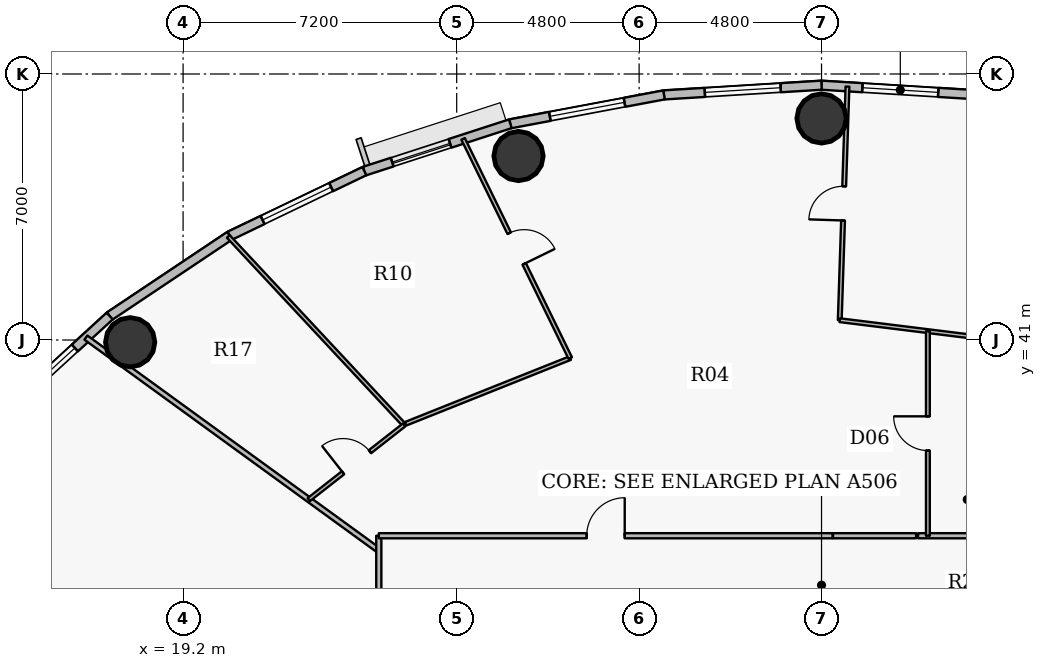
"""IFC4 building model, lengths in metres.
Left out: names, types, materials, properties, quantities, classifications, styles, units other than length and angle.
Written with IfcOpenShell. Run it as: python <this file> out.ifc"""

import sys

from ifc_helpers import new_model, si_unit, direction, frame, frame_2d, origin, origin_2d, place, context, subcontext, project, spatial, rectangle, hollow_circle, extrude, source, transform, mapped, element, fill, save


model = new_model("IFC4")
c1 = context("Model", 3, precision=1e-05, world=origin(), true_north=direction((0.0, 1.0)))
c2 = subcontext(c1, "Body", "Model", "MODEL_VIEW")
j1 = project(units=[si_unit("LENGTHUNIT", "METRE"), si_unit("PLANEANGLEUNIT", "RADIAN")], contexts=[c1])
p1 = place(None, origin())
s1 = spatial("IfcSite", under=j1, at=p1, CompositionType="ELEMENT")
p2 = place(p1, origin())
s2 = spatial("IfcBuilding", under=s1, at=p2, CompositionType="ELEMENT")
p3 = place(p2, frame((0.0, 0.0, 197.4)))
s3 = spatial("IfcBuildingStorey", under=s2, at=p3, CompositionType="ELEMENT", Elevation=197.4)
for number, where, z_axis, x_axis in (
    (1, (36.0, 46.83, 0.0), (0.0, 0.0, 1.0), (1.0, 0.0, 0.0)),
    (2, (28.027, 45.841, 0.0), (0.0, 0.0, 1.0), (1.0, 0.0, 0.0)),
    (3, (17.808, 40.942, 0.0), (0.0, 0.0, 1.0), (1.0, 0.0, 0.0)),
):
    element("IfcColumn", number, at=place(p3, frame(where, z_axis=z_axis, x_axis=x_axis)), inside=s3, PredefinedType="COLUMN", context=c2, shape_type="SweptSolid", body=[
        extrude(hollow_circle(Radius=0.65, WallThickness=0.04, at=origin_2d()), origin(), (0.0, 0.0, 1.0), 3.75),
    ])
p4 = place(p3, frame((36.0, 47.705, 0.0), z_axis=(0.0, 0.0, 1.0), x_axis=(0.998104600619, -0.061540281305, 0.0)))
e4 = element("IfcWall", 4, at=p4, inside=s3, PredefinedType="SOLIDWALL", context=c2, shape_type="SweptSolid", body=[
    extrude(rectangle(XDim=4.154, YDim=0.24, at=frame_2d((2.077, 0.0))), origin(), (0.0, 0.0, 1.0), 3.5),
])
p5 = place(p4, frame((1.077, 0.0, 0.9)))
e5 = element("IfcOpeningElement", 5, at=p5, cuts=e4, PredefinedType="OPENING", context=c2, shape_type="SweptSolid", body=[
    extrude(rectangle(XDim=2.0, YDim=1.75, at=origin_2d()), frame((1.0, 0.13, 0.875), z_axis=(0.0, -1.0, 0.0), x_axis=(1.0, 0.0, 0.0)), (0.0, 0.0, 1.0), 0.26),
])
p6 = place(p3, frame((31.854, 47.449, 0.0), z_axis=(0.0, 0.0, 1.0), x_axis=(0.998104600619, 0.061540281305, 0.0)))
e6 = element("IfcWall", 6, at=p6, inside=s3, PredefinedType="SOLIDWALL", context=c2, shape_type="SweptSolid", body=[
    extrude(rectangle(XDim=4.154, YDim=0.24, at=frame_2d((2.077, 0.0))), origin(), (0.0, 0.0, 1.0), 3.5),
])
p7 = place(p6, frame((1.077, 0.0, 0.9)))
e7 = element("IfcOpeningElement", 7, at=p7, cuts=e6, PredefinedType="OPENING", context=c2, shape_type="SweptSolid", body=[
    extrude(rectangle(XDim=2.0, YDim=1.75, at=origin_2d()), frame((1.0, 0.13, 0.875), z_axis=(0.0, -1.0, 0.0), x_axis=(1.0, 0.0, 0.0)), (0.0, 0.0, 1.0), 0.26),
])
p8 = place(p3, frame((27.811, 46.689, 0.0), z_axis=(0.0, 0.0, 1.0), x_axis=(0.982788108205, 0.184736391573, 0.0)))
e8 = element("IfcWall", 8, at=p8, inside=s3, PredefinedType="SOLIDWALL", context=c2, shape_type="SweptSolid", body=[
    extrude(rectangle(XDim=4.114, YDim=0.24, at=frame_2d((2.057, 0.0))), origin(), (0.0, 0.0, 1.0), 3.5),
])
p9 = place(p8, frame((1.057, 0.0, 0.9)))
e9 = element("IfcOpeningElement", 9, at=p9, cuts=e8, PredefinedType="OPENING", context=c2, shape_type="SweptSolid", body=[
    extrude(rectangle(XDim=2.0, YDim=1.75, at=origin_2d()), frame((1.0, 0.13, 0.875), z_axis=(0.0, -1.0, 0.0), x_axis=(1.0, 0.0, 0.0)), (0.0, 0.0, 1.0), 0.26),
])
p10 = place(p3, frame((23.97, 45.444, 0.0), z_axis=(0.0, 0.0, 1.0), x_axis=(0.951209870236, 0.30854462038, 0.0)))
e10 = element("IfcWall", 10, at=p10, inside=s3, PredefinedType="SOLIDWALL", context=c2, shape_type="SweptSolid", body=[
    extrude(rectangle(XDim=4.038, YDim=0.24, at=frame_2d((2.019, 0.0))), origin(), (0.0, 0.0, 1.0), 3.5),
])
p11 = place(p10, frame((0.77, 0.0, 0.9)))
e11 = element("IfcOpeningElement", 11, at=p11, cuts=e10, PredefinedType="OPENING", context=c2, shape_type="SweptSolid", body=[
    extrude(rectangle(XDim=1.6, YDim=1.75, at=origin_2d()), frame((0.8, 0.13, 0.875), z_axis=(0.0, -1.0, 0.0), x_axis=(1.0, 0.0, 0.0)), (0.0, 0.0, 1.0), 0.26),
])
p12 = place(p3, frame((20.427, 43.743, 0.0), z_axis=(0.0, 0.0, 1.0), x_axis=(0.901564733809, 0.432644231155, 0.0)))
e12 = element("IfcWall", 12, at=p12, inside=s3, PredefinedType="SOLIDWALL", context=c2, shape_type="SweptSolid", body=[
    extrude(rectangle(XDim=3.93, YDim=0.24, at=frame_2d((1.965, 0.0))), origin(), (0.0, 0.0, 1.0), 3.5),
])
p13 = place(p12, frame((0.96, 0.0, 0.9)))
e13 = element("IfcOpeningElement", 13, at=p13, cuts=e12, PredefinedType="OPENING", context=c2, shape_type="SweptSolid", body=[
    extrude(rectangle(XDim=2.0, YDim=1.75, at=origin_2d()), frame((1.0, 0.13, 0.875), z_axis=(0.0, -1.0, 0.0), x_axis=(1.0, 0.0, 0.0)), (0.0, 0.0, 1.0), 0.26),
])
p14 = place(p3, frame((17.268, 41.631, 0.0), z_axis=(0.0, 0.0, 1.0), x_axis=(0.831228998277, 0.555930168657, 0.0)))
e14 = element("IfcWall", 14, at=p14, inside=s3, PredefinedType="SOLIDWALL", context=c2, shape_type="SweptSolid", body=[
    extrude(rectangle(XDim=3.8, YDim=0.24, at=frame_2d((1.9, 0.0))), origin(), (0.0, 0.0, 1.0), 3.5),
])
p15 = place(p3, frame((14.572, 39.158, 0.0), z_axis=(0.0, 0.0, 1.0), x_axis=(0.737076565834, 0.675809245349, 0.0)))
e15 = element("IfcWall", 15, at=p15, inside=s3, PredefinedType="SOLIDWALL", context=c2, shape_type="SweptSolid", body=[
    extrude(rectangle(XDim=3.658, YDim=0.24, at=frame_2d((1.829, 0.0))), origin(), (0.0, 0.0, 1.0), 3.5),
])
p16 = place(p15, frame((0.815, 0.0, 0.9)))
e16 = element("IfcOpeningElement", 16, at=p16, cuts=e15, PredefinedType="OPENING", context=c2, shape_type="SweptSolid", body=[
    extrude(rectangle(XDim=1.6, YDim=1.75, at=origin_2d()), frame((0.8, 0.13, 0.875), z_axis=(0.0, -1.0, 0.0), x_axis=(1.0, 0.0, 0.0)), (0.0, 0.0, 1.0), 0.26),
])
p17 = place(p3, frame((16.643, 41.064, 0.0), z_axis=(0.0, 0.0, 1.0), x_axis=(0.809016355942, -0.587786131018, 0.0)))
e17 = element("IfcWall", 17, at=p17, inside=s3, PredefinedType="PARTITIONING", context=c2, shape_type="SweptSolid", body=[
    extrude(rectangle(XDim=9.527, YDim=0.135, at=frame_2d((4.764, 0.0))), origin(), (0.0, 0.0, 1.0), 2.935),
])
p18 = place(p3, frame((20.39, 43.725, 0.0), z_axis=(0.0, 0.0, 1.0), x_axis=(0.682297728918, -0.73107442105, 0.0)))
e18 = element("IfcWall", 18, at=p18, inside=s3, PredefinedType="PARTITIONING", context=c2, shape_type="SweptSolid", body=[
    extrude(rectangle(XDim=6.782, YDim=0.1, at=frame_2d((3.391, 0.0))), origin(), (0.0, 0.0, 1.0), 2.935),
])
p19 = place(p3, frame((22.509, 36.802, 0.0), z_axis=(0.0, 0.0, 1.0), x_axis=(0.787322269852, 0.616541680177, 0.0)))
e19 = element("IfcWall", 19, at=p19, inside=s3, PredefinedType="PARTITIONING", context=c2, shape_type="SweptSolid", body=[
    extrude(rectangle(XDim=3.187, YDim=0.1, at=frame_2d((1.593, 0.0))), origin(), (0.0, 0.0, 1.0), 2.935),
])
p20 = place(p19, frame((1.143, 0.0, 0.0)))
e20 = element("IfcOpeningElement", 20, at=p20, cuts=e19, PredefinedType="OPENING", context=c2, shape_type="SweptSolid", body=[
    extrude(rectangle(XDim=0.9, YDim=2.1, at=origin_2d()), frame((0.45, 0.06, 1.05), z_axis=(0.0, -1.0, 0.0), x_axis=(1.0, 0.0, 0.0)), (0.0, 0.0, 1.0), 0.12),
])
p21 = place(p3, frame((24.35, 27.95, 0.0), z_axis=(0.0, 0.0, 1.0), x_axis=(0.0, 1.0, 0.0)))
e21 = element("IfcWall", 21, at=p21, inside=s3, PredefinedType="PARTITIONING", context=c2, shape_type="SweptSolid", body=[
    extrude(rectangle(XDim=7.9, YDim=0.135, at=frame_2d((3.95, 0.0))), origin(), (0.0, 0.0, 1.0), 2.935),
])
p22 = place(p3, frame((24.35, 35.85, 0.0), z_axis=(0.0, 0.0, 1.0), x_axis=(1.0, 0.0, 0.0)))
e22 = element("IfcWall", 22, at=p22, inside=s3, PredefinedType="PARTITIONING", context=c2, shape_type="SweptSolid", body=[
    extrude(rectangle(XDim=11.942, YDim=0.135, at=frame_2d((5.971, 0.0))), origin(), (0.0, 0.0, 1.0), 2.935),
])
p23 = place(p22, frame((5.471, 0.0, 0.0)))
e23 = element("IfcOpeningElement", 23, at=p23, cuts=e22, PredefinedType="OPENING", context=c2, shape_type="SweptSolid", body=[
    extrude(rectangle(XDim=1.0, YDim=2.15, at=origin_2d()), frame((0.5, 0.078, 1.075), z_axis=(0.0, -1.0, 0.0), x_axis=(1.0, 0.0, 0.0)), (0.0, 0.0, 1.0), 0.155),
])
p24 = place(p3, frame((25.055, 38.796, 0.0), z_axis=(0.0, 0.0, 1.0), x_axis=(0.928801214375, 0.370578337434, 0.0)))
e24 = element("IfcWall", 24, at=p24, inside=s3, PredefinedType="PARTITIONING", context=c2, shape_type="SweptSolid", body=[
    extrude(rectangle(XDim=4.664, YDim=0.1, at=frame_2d((2.332, 0.0))), origin(), (0.0, 0.0, 1.0), 3.5),
])
p25 = place(p3, frame((26.568, 46.292, 0.0), z_axis=(0.0, 0.0, 1.0), x_axis=(0.439223775301, -0.898377690735, 0.0)))
e25 = element("IfcWall", 25, at=p25, inside=s3, PredefinedType="PARTITIONING", context=c2, shape_type="SweptSolid", body=[
    extrude(rectangle(XDim=6.419, YDim=0.1, at=frame_2d((3.209, 0.0))), origin(), (0.0, 0.0, 1.0), 2.935),
])
p26 = place(p25, frame((2.76, 0.0, 0.0)))
e26 = element("IfcOpeningElement", 26, at=p26, cuts=e25, PredefinedType="OPENING", context=c2, shape_type="SweptSolid", body=[
    extrude(rectangle(XDim=0.9, YDim=2.1, at=origin_2d()), frame((0.45, 0.06, 1.05), z_axis=(0.0, -1.0, 0.0), x_axis=(1.0, 0.0, 0.0)), (0.0, 0.0, 1.0), 0.12),
])
p27 = place(p3, frame((36.48, 41.521, 0.0), z_axis=(0.0, 0.0, 1.0), x_axis=(0.033029315495, 0.99945438331, 0.0)))
e27 = element("IfcWall", 27, at=p27, inside=s3, PredefinedType="PARTITIONING", context=c2, shape_type="SweptSolid", body=[
    extrude(rectangle(XDim=6.15, YDim=0.1, at=frame_2d((3.075, 0.0))), origin(), (0.0, 0.0, 1.0), 2.935),
])
p28 = place(p27, frame((2.625, 0.0, 0.0)))
e28 = element("IfcOpeningElement", 28, at=p28, cuts=e27, PredefinedType="OPENING", context=c2, shape_type="SweptSolid", body=[
    extrude(rectangle(XDim=0.9, YDim=2.1, at=origin_2d()), frame((0.45, 0.06, 1.05), z_axis=(0.0, -1.0, 0.0), x_axis=(1.0, 0.0, 0.0)), (0.0, 0.0, 1.0), 0.12),
])
p29 = place(p3, frame((36.48, 41.521, 0.0), z_axis=(0.0, 0.0, 1.0), x_axis=(0.992397562131, -0.123073468612, 0.0)))
e29 = element("IfcWall", 29, at=p29, inside=s3, PredefinedType="PARTITIONING", context=c2, shape_type="SweptSolid", body=[
    extrude(rectangle(XDim=5.314, YDim=0.1, at=frame_2d((2.657, 0.0))), origin(), (0.0, 0.0, 1.0), 3.5),
])
p30 = place(p3, frame((38.541, 35.85, 0.0), z_axis=(0.0, 0.0, 1.0), x_axis=(1.0, 0.0, 0.0)))
e30 = element("IfcWall", 30, at=p30, inside=s3, PredefinedType="PARTITIONING", context=c2, shape_type="SweptSolid", body=[
    extrude(rectangle(XDim=14.913, YDim=0.135, at=frame_2d((7.456, 0.0))), origin(), (0.0, 0.0, 1.0), 2.935),
])
p31 = place(p30, frame((9.46, 0.0, 0.0)))
e31 = element("IfcOpeningElement", 31, at=p31, cuts=e30, PredefinedType="OPENING", context=c2, shape_type="SweptSolid", body=[
    extrude(rectangle(XDim=1.0, YDim=2.15, at=origin_2d()), frame((0.5, 0.078, 1.075), z_axis=(0.0, -1.0, 0.0), x_axis=(1.0, 0.0, 0.0)), (0.0, 0.0, 1.0), 0.155),
])
p32 = place(p3, frame((38.799, 35.85, 0.0), z_axis=(0.0, 0.0, 1.0), x_axis=(0.0, 1.0, 0.0)))
e32 = element("IfcWall", 32, at=p32, inside=s3, PredefinedType="PARTITIONING", context=c2, shape_type="SweptSolid", body=[
    extrude(rectangle(XDim=5.384, YDim=0.1, at=frame_2d((2.692, 0.0))), origin(), (0.0, 0.0, 1.0), 3.5),
])
p33 = place(p32, frame((2.242, 0.0, 0.0)))
e33 = element("IfcOpeningElement", 33, at=p33, cuts=e32, PredefinedType="OPENING", context=c2, shape_type="SweptSolid", body=[
    extrude(rectangle(XDim=0.9, YDim=2.1, at=origin_2d()), frame((0.45, 0.06, 1.05), z_axis=(0.0, -1.0, 0.0), x_axis=(1.0, 0.0, 0.0)), (0.0, 0.0, 1.0), 0.12),
])
p34 = place(p3, frame((36.302, 35.85, 0.0), z_axis=(0.0, 0.0, 1.0), x_axis=(1.0, 0.0, 0.0)))
e34 = element("IfcWall", 34, at=p34, inside=s3, PredefinedType="PARTITIONING", context=c2, shape_type="SweptSolid", body=[
    extrude(rectangle(XDim=2.187, YDim=0.135, at=frame_2d((1.093, 0.0))), origin(), (0.0, 0.0, 1.0), 3.5),
])
m1 = source(origin(), c2, "Body", "SweptSolid", [
    extrude(rectangle(XDim=2.0, YDim=1.75, at=origin_2d()), frame((1.0, 0.03, 0.875), z_axis=(0.0, -1.0, 0.0), x_axis=(1.0, 0.0, 0.0)), (0.0, 0.0, 1.0), 0.06),
])
p35 = place(p5, origin())
e35 = element("IfcWindow", 35, at=p35, inside=s3, PartitioningType="DOUBLE_PANEL_VERTICAL", PredefinedType="WINDOW", context=c2, shape_type="MappedRepresentation", body=[
    mapped(m1, transform((0.0, 0.0, 0.0), x_axis=(1.0, 0.0, 0.0), y_axis=(0.0, 1.0, 0.0), z_axis=(0.0, 0.0, 1.0), scale=1.0)),
])
fill(e5, e35)
p36 = place(p7, origin())
e36 = element("IfcWindow", 36, at=p36, inside=s3, PartitioningType="DOUBLE_PANEL_VERTICAL", PredefinedType="WINDOW", context=c2, shape_type="MappedRepresentation", body=[
    mapped(m1, transform((0.0, 0.0, 0.0), x_axis=(1.0, 0.0, 0.0), y_axis=(0.0, 1.0, 0.0), z_axis=(0.0, 0.0, 1.0), scale=1.0)),
])
fill(e7, e36)
p37 = place(p9, origin())
e37 = element("IfcWindow", 37, at=p37, inside=s3, PartitioningType="DOUBLE_PANEL_VERTICAL", PredefinedType="WINDOW", context=c2, shape_type="MappedRepresentation", body=[
    mapped(m1, transform((0.0, 0.0, 0.0), x_axis=(1.0, 0.0, 0.0), y_axis=(0.0, 1.0, 0.0), z_axis=(0.0, 0.0, 1.0), scale=1.0)),
])
fill(e9, e37)
m2 = source(origin(), c2, "Body", "SweptSolid", [
    extrude(rectangle(XDim=1.6, YDim=1.75, at=origin_2d()), frame((0.8, 0.03, 0.875), z_axis=(0.0, -1.0, 0.0), x_axis=(1.0, 0.0, 0.0)), (0.0, 0.0, 1.0), 0.06),
])
p38 = place(p11, origin())
e38 = element("IfcWindow", 38, at=p38, inside=s3, PartitioningType="DOUBLE_PANEL_VERTICAL", PredefinedType="WINDOW", context=c2, shape_type="MappedRepresentation", body=[
    mapped(m2, transform((0.0, 0.0, 0.0), x_axis=(1.0, 0.0, 0.0), y_axis=(0.0, 1.0, 0.0), z_axis=(0.0, 0.0, 1.0), scale=1.0)),
])
fill(e11, e38)
p39 = place(p13, origin())
e39 = element("IfcWindow", 39, at=p39, inside=s3, PartitioningType="DOUBLE_PANEL_VERTICAL", PredefinedType="WINDOW", context=c2, shape_type="MappedRepresentation", body=[
    mapped(m1, transform((0.0, 0.0, 0.0), x_axis=(1.0, 0.0, 0.0), y_axis=(0.0, 1.0, 0.0), z_axis=(0.0, 0.0, 1.0), scale=1.0)),
])
fill(e13, e39)
p40 = place(p16, origin())
e40 = element("IfcWindow", 40, at=p40, inside=s3, PartitioningType="DOUBLE_PANEL_VERTICAL", PredefinedType="WINDOW", context=c2, shape_type="MappedRepresentation", body=[
    mapped(m2, transform((0.0, 0.0, 0.0), x_axis=(1.0, 0.0, 0.0), y_axis=(0.0, 1.0, 0.0), z_axis=(0.0, 0.0, 1.0), scale=1.0)),
])
fill(e16, e40)
m3 = source(origin(), c2, "Body", "SweptSolid", [
    extrude(rectangle(XDim=1.0, YDim=2.15, at=origin_2d()), frame((0.5, 0.025, 1.075), z_axis=(0.0, -1.0, 0.0), x_axis=(1.0, 0.0, 0.0)), (0.0, 0.0, 1.0), 0.05),
])
p41 = place(p23, origin())
e41 = element("IfcDoor", 41, at=p41, inside=s3, OperationType="SINGLE_SWING_RIGHT", PredefinedType="DOOR", context=c2, shape_type="MappedRepresentation", body=[
    mapped(m3, transform((0.0, 0.0, 0.0), x_axis=(1.0, 0.0, 0.0), y_axis=(0.0, 1.0, 0.0), z_axis=(0.0, 0.0, 1.0), scale=1.0)),
])
fill(e23, e41)
m4 = source(origin(), c2, "Body", "SweptSolid", [
    extrude(rectangle(XDim=0.9, YDim=2.1, at=origin_2d()), frame((0.45, 0.025, 1.05), z_axis=(0.0, -1.0, 0.0), x_axis=(1.0, 0.0, 0.0)), (0.0, 0.0, 1.0), 0.05),
])
p42 = place(p28, origin())
e42 = element("IfcDoor", 42, at=p42, inside=s3, OperationType="SINGLE_SWING_LEFT", PredefinedType="DOOR", context=c2, shape_type="MappedRepresentation", body=[
    mapped(m4, transform((0.0, 0.0, 0.0), x_axis=(1.0, 0.0, 0.0), y_axis=(0.0, 1.0, 0.0), z_axis=(0.0, 0.0, 1.0), scale=1.0)),
])
fill(e28, e42)
p43 = place(p26, origin())
e43 = element("IfcDoor", 43, at=p43, inside=s3, OperationType="SINGLE_SWING_RIGHT", PredefinedType="DOOR", context=c2, shape_type="MappedRepresentation", body=[
    mapped(m4, transform((0.0, 0.0, 0.0), x_axis=(1.0, 0.0, 0.0), y_axis=(0.0, 1.0, 0.0), z_axis=(0.0, 0.0, 1.0), scale=1.0)),
])
fill(e26, e43)
p44 = place(p20, origin())
e44 = element("IfcDoor", 44, at=p44, inside=s3, OperationType="SINGLE_SWING_LEFT", PredefinedType="DOOR", context=c2, shape_type="MappedRepresentation", body=[
    mapped(m4, transform((0.0, 0.0, 0.0), x_axis=(1.0, 0.0, 0.0), y_axis=(0.0, 1.0, 0.0), z_axis=(0.0, 0.0, 1.0), scale=1.0)),
])
fill(e20, e44)
p45 = place(p33, origin())
e45 = element("IfcDoor", 45, at=p45, inside=s3, OperationType="SINGLE_SWING_RIGHT", PredefinedType="DOOR", context=c2, shape_type="MappedRepresentation", body=[
    mapped(m4, transform((0.0, 0.0, 0.0), x_axis=(1.0, 0.0, 0.0), y_axis=(0.0, 1.0, 0.0), z_axis=(0.0, 0.0, 1.0), scale=1.0)),
])
fill(e33, e45)
save(model, sys.argv[1])
